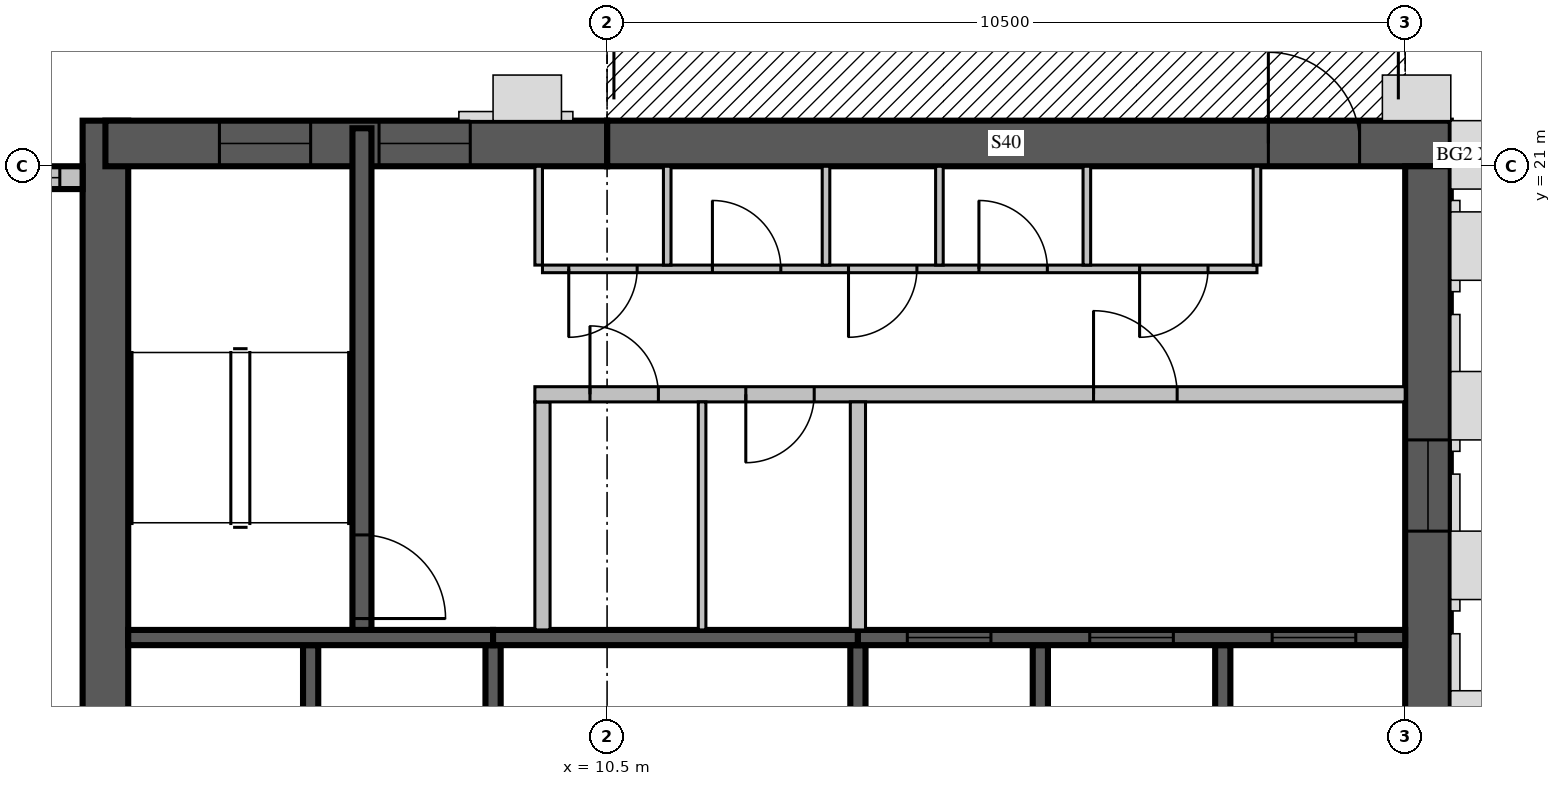
"""IFC4 building model, lengths in metres.
Left out: names, types, materials, properties, quantities, classifications, styles, units other than length and angle.
Written with IfcOpenShell. Run it as: python <this file> out.ifc"""

import sys

from ifc_helpers import new_model, si_unit, direction, frame, frame_2d, origin, place, context, subcontext, project, spatial, rectangle, extrude, source, transform, mapped, element, fill, save


model = new_model("IFC4")
c1 = context("Model", 3, precision=1e-05, world=origin(), true_north=direction((0.0, 1.0)))
c2 = subcontext(c1, "Body", "Model", "MODEL_VIEW")
j1 = project(units=[si_unit("LENGTHUNIT", "METRE"), si_unit("PLANEANGLEUNIT", "RADIAN")], contexts=[c1])
p1 = place(None, origin())
s1 = spatial("IfcSite", under=j1, at=p1, CompositionType="ELEMENT")
p2 = place(p1, origin())
s2 = spatial("IfcBuilding", under=s1, at=p2, CompositionType="ELEMENT")
p3 = place(p2, frame((0.0, 0.0, 309.0)))
s3 = spatial("IfcBuildingStorey", under=s2, at=p3, CompositionType="ELEMENT", Elevation=309.0)
m1 = source(origin(), c2, "Body", "SweptSolid", [
    extrude(rectangle(XDim=17.4, YDim=0.6, at=frame_2d((8.7, 0.0))), origin(), (0.0, 0.0, 1.0), 3.5),
])
p4 = place(p3, frame((3.9, 4.2, 0.0), z_axis=(0.0, 0.0, 1.0), x_axis=(0.0, 1.0, 0.0)))
e1 = element("IfcWall", 1, at=p4, inside=s3, PredefinedType="SHEAR", context=c2, shape_type="MappedRepresentation", body=[
    mapped(m1, transform((0.0, 0.0, 0.0), scale=1.0)),
])
m2 = source(origin(), c2, "Body", "SweptSolid", [
    extrude(rectangle(XDim=2.2, YDim=2.1, at=frame_2d((1.1, 1.05))), frame((0.0, 0.31, 0.0), z_axis=(0.0, -1.0, 0.0), x_axis=(1.0, 0.0, 0.0)), (0.0, 0.0, 1.0), 0.62),
])
p5 = place(p4, frame((4.2, 0.0, 0.0)))
e2 = element("IfcOpeningElement", 2, at=p5, cuts=e1, PredefinedType="OPENING", context=c2, shape_type="MappedRepresentation", body=[
    mapped(m2, transform((0.0, 0.0, 0.0), scale=1.0)),
])
m3 = source(origin(), c2, "Body", "SweptSolid", [
    extrude(rectangle(XDim=11.1, YDim=0.6, at=frame_2d((5.55, 0.0))), origin(), (0.0, 0.0, 1.0), 3.5),
])
p6 = place(p3, frame((10.5, 21.3, 0.0), z_axis=(0.0, 0.0, 1.0), x_axis=(1.0, 0.0, 0.0)))
e3 = element("IfcWall", 3, at=p6, inside=s3, PredefinedType="SHEAR", context=c2, shape_type="MappedRepresentation", body=[
    mapped(m3, transform((0.0, 0.0, 0.0), scale=1.0)),
])
m4 = source(origin(), c2, "Body", "SweptSolid", [
    extrude(rectangle(XDim=1.2, YDim=2.1, at=frame_2d((0.6, 1.05))), frame((0.0, 0.31, 0.0), z_axis=(0.0, -1.0, 0.0), x_axis=(1.0, 0.0, 0.0)), (0.0, 0.0, 1.0), 0.62),
])
p7 = place(p6, frame((8.7, 0.0, 0.0)))
e4 = element("IfcOpeningElement", 4, at=p7, cuts=e3, PredefinedType="OPENING", context=c2, shape_type="MappedRepresentation", body=[
    mapped(m4, transform((0.0, 0.0, 0.0), scale=1.0)),
])
m5 = source(origin(), c2, "Body", "SweptSolid", [
    extrude(rectangle(XDim=10.5, YDim=0.6, at=frame_2d((5.25, 0.0))), origin(), (0.0, 0.0, 1.0), 3.5),
])
p8 = place(p3, frame((21.3, 10.5, 0.0), z_axis=(0.0, 0.0, 1.0), x_axis=(0.0, 1.0, 0.0)))
e5 = element("IfcWall", 5, at=p8, inside=s3, PredefinedType="SHEAR", context=c2, shape_type="MappedRepresentation", body=[
    mapped(m5, transform((0.0, 0.0, 0.0), scale=1.0)),
])
m6 = source(origin(), c2, "Body", "SweptSolid", [
    extrude(rectangle(XDim=1.2, YDim=2.4, at=frame_2d((0.6, 1.2))), frame((0.0, 0.31, 0.0), z_axis=(0.0, -1.0, 0.0), x_axis=(1.0, 0.0, 0.0)), (0.0, 0.0, 1.0), 0.62),
])
p9 = place(p8, frame((5.7, 0.0, 0.6)))
e6 = element("IfcOpeningElement", 6, at=p9, cuts=e5, PredefinedType="OPENING", context=c2, shape_type="MappedRepresentation", body=[
    mapped(m6, transform((0.0, 0.0, 0.0), scale=1.0)),
])
m7 = source(origin(), c2, "Body", "SweptSolid", [
    extrude(rectangle(XDim=6.6, YDim=0.6, at=frame_2d((3.3, 0.0))), origin(), (0.0, 0.0, 1.0), 3.5),
])
p10 = place(p3, frame((3.9, 21.3, 0.0), z_axis=(0.0, 0.0, 1.0), x_axis=(1.0, 0.0, 0.0)))
e7 = element("IfcWall", 7, at=p10, inside=s3, PredefinedType="SHEAR", context=c2, shape_type="MappedRepresentation", body=[
    mapped(m7, transform((0.0, 0.0, 0.0), scale=1.0)),
])
p11 = place(p10, frame((1.5, 0.0, 0.6)))
e8 = element("IfcOpeningElement", 8, at=p11, cuts=e7, PredefinedType="OPENING", context=c2, shape_type="MappedRepresentation", body=[
    mapped(m6, transform((0.0, 0.0, 0.0), scale=1.0)),
])
p12 = place(p10, frame((3.6, 0.0, 0.6)))
e9 = element("IfcOpeningElement", 9, at=p12, cuts=e7, PredefinedType="OPENING", context=c2, shape_type="MappedRepresentation", body=[
    mapped(m6, transform((0.0, 0.0, 0.0), scale=1.0)),
])
m8 = source(origin(), c2, "Body", "SweptSolid", [
    extrude(rectangle(XDim=2.9, YDim=0.3, at=frame_2d((1.45, 0.0))), origin(), (0.0, 0.0, 1.0), 3.1),
])
p13 = place(p3, frame((3.6, 20.85, 0.0), z_axis=(0.0, 0.0, 1.0), x_axis=(-1.0, 0.0, 0.0)))
e10 = element("IfcWall", 10, at=p13, inside=s3, PredefinedType="STANDARD", context=c2, shape_type="MappedRepresentation", body=[
    mapped(m8, transform((0.0, 0.0, 0.0), scale=1.0)),
])
m9 = source(origin(), c2, "Body", "SweptSolid", [
    extrude(rectangle(XDim=2.4, YDim=2.0, at=frame_2d((1.2, 1.0))), frame((0.0, 0.16, 0.0), z_axis=(0.0, -1.0, 0.0), x_axis=(1.0, 0.0, 0.0)), (0.0, 0.0, 1.0), 0.32),
])
p14 = place(p13, frame((0.3, 0.0, 0.6)))
e11 = element("IfcOpeningElement", 11, at=p14, cuts=e10, PredefinedType="OPENING", context=c2, shape_type="MappedRepresentation", body=[
    mapped(m9, transform((0.0, 0.0, 0.0), scale=1.0)),
])
m10 = source(origin(), c2, "Body", "SweptSolid", [
    extrude(rectangle(XDim=3.0, YDim=0.2, at=frame_2d((1.5, 0.0))), origin(), (0.0, 0.0, 1.0), 3.5),
])
p15 = place(p3, frame((6.6, 11.7, 0.0), z_axis=(0.0, 0.0, 1.0), x_axis=(0.0, 1.0, 0.0)))
e12 = element("IfcWall", 12, at=p15, inside=s3, PredefinedType="SOLIDWALL", context=c2, shape_type="MappedRepresentation", body=[
    mapped(m10, transform((0.0, 0.0, 0.0), scale=1.0)),
])
m11 = source(origin(), c2, "Body", "SweptSolid", [
    extrude(rectangle(XDim=3.0, YDim=0.2, at=frame_2d((1.5, 0.0))), origin(), (0.0, 0.0, 1.0), 3.1),
])
for number, where, z_axis, x_axis in (
    (13, (9.0, 11.7, 0.0), (0.0, 0.0, 1.0), (0.0, 1.0, 0.0)),
    (14, (13.8, 11.7, 0.0), (0.0, 0.0, 1.0), (0.0, 1.0, 0.0)),
):
    element("IfcWall", number, at=place(p3, frame(where, z_axis=z_axis, x_axis=x_axis)), inside=s3, PredefinedType="SOLIDWALL", context=c2, shape_type="MappedRepresentation", body=[
        mapped(m11, transform((0.0, 0.0, 0.0), scale=1.0)),
    ])
for number, where, z_axis, x_axis in (
    (15, (16.2, 11.7, 0.0), (0.0, 0.0, 1.0), (0.0, 1.0, 0.0)),
    (16, (18.6, 11.7, 0.0), (0.0, 0.0, 1.0), (0.0, 1.0, 0.0)),
):
    element("IfcWall", number, at=place(p3, frame(where, z_axis=z_axis, x_axis=x_axis)), inside=s3, PredefinedType="SOLIDWALL", context=c2, shape_type="MappedRepresentation", body=[
        mapped(m10, transform((0.0, 0.0, 0.0), scale=1.0)),
    ])
m12 = source(origin(), c2, "Body", "SweptSolid", [
    extrude(rectangle(XDim=4.8, YDim=0.2, at=frame_2d((2.4, 0.0))), origin(), (0.0, 0.0, 1.0), 3.5),
])
p16 = place(p3, frame((4.2, 14.8, 0.0), z_axis=(0.0, 0.0, 1.0), x_axis=(1.0, 0.0, 0.0)))
e17 = element("IfcWall", 17, at=p16, inside=s3, PredefinedType="SOLIDWALL", context=c2, shape_type="MappedRepresentation", body=[
    mapped(m12, transform((0.0, 0.0, 0.0), scale=1.0)),
])
m13 = source(origin(), c2, "Body", "SweptSolid", [
    extrude(rectangle(XDim=4.8, YDim=0.2, at=frame_2d((2.4, 0.0))), origin(), (0.0, 0.0, 1.0), 3.1),
])
p17 = place(p3, frame((9.0, 14.8, 0.0), z_axis=(0.0, 0.0, 1.0), x_axis=(1.0, 0.0, 0.0)))
e18 = element("IfcWall", 18, at=p17, inside=s3, PredefinedType="SOLIDWALL", context=c2, shape_type="MappedRepresentation", body=[
    mapped(m13, transform((0.0, 0.0, 0.0), scale=1.0)),
])
m14 = source(origin(), c2, "Body", "SweptSolid", [
    extrude(rectangle(XDim=7.2, YDim=0.2, at=frame_2d((3.6, 0.0))), origin(), (0.0, 0.0, 1.0), 3.5),
])
p18 = place(p3, frame((13.8, 14.8, 0.0), z_axis=(0.0, 0.0, 1.0), x_axis=(1.0, 0.0, 0.0)))
e19 = element("IfcWall", 19, at=p18, inside=s3, PredefinedType="SOLIDWALL", context=c2, shape_type="MappedRepresentation", body=[
    mapped(m14, transform((0.0, 0.0, 0.0), scale=1.0)),
])
m15 = source(origin(), c2, "Body", "SweptSolid", [
    extrude(rectangle(XDim=1.1, YDim=2.1, at=frame_2d((0.55, 1.05))), frame((0.0, 0.11, 0.0), z_axis=(0.0, -1.0, 0.0), x_axis=(1.0, 0.0, 0.0)), (0.0, 0.0, 1.0), 0.22),
])
p19 = place(p18, frame((0.65, 0.0, 0.0)))
e20 = element("IfcOpeningElement", 20, at=p19, cuts=e19, PredefinedType="OPENING", context=c2, shape_type="MappedRepresentation", body=[
    mapped(m15, transform((0.0, 0.0, 0.0), scale=1.0)),
])
p20 = place(p18, frame((3.05, 0.0, 0.0)))
e21 = element("IfcOpeningElement", 21, at=p20, cuts=e19, PredefinedType="OPENING", context=c2, shape_type="MappedRepresentation", body=[
    mapped(m15, transform((0.0, 0.0, 0.0), scale=1.0)),
])
p21 = place(p18, frame((5.45, 0.0, 0.0)))
e22 = element("IfcOpeningElement", 22, at=p21, cuts=e19, PredefinedType="OPENING", context=c2, shape_type="MappedRepresentation", body=[
    mapped(m15, transform((0.0, 0.0, 0.0), scale=1.0)),
])
m16 = source(origin(), c2, "Body", "SweptSolid", [
    extrude(rectangle(XDim=6.6, YDim=0.25, at=frame_2d((3.3, 0.0))), origin(), (0.0, 0.0, 1.0), 3.1),
])
p22 = place(p3, frame((7.275, 14.9, 0.0), z_axis=(0.0, 0.0, 1.0), x_axis=(0.0, 1.0, 0.0)))
e23 = element("IfcWall", 23, at=p22, inside=s3, PredefinedType="SOLIDWALL", context=c2, shape_type="MappedRepresentation", body=[
    mapped(m16, transform((0.0, 0.0, 0.0), scale=1.0)),
])
m17 = source(origin(), c2, "Body", "SweptSolid", [
    extrude(rectangle(XDim=1.1, YDim=2.1, at=frame_2d((0.55, 1.05))), frame((0.0, 0.135, 0.0), z_axis=(0.0, -1.0, 0.0), x_axis=(1.0, 0.0, 0.0)), (0.0, 0.0, 1.0), 0.27),
])
p23 = place(p22, frame((0.15, 0.0, 0.0)))
e24 = element("IfcOpeningElement", 24, at=p23, cuts=e23, PredefinedType="OPENING", context=c2, shape_type="MappedRepresentation", body=[
    mapped(m17, transform((0.0, 0.0, 0.0), scale=1.0)),
])
m18 = source(origin(), c2, "Body", "SweptSolid", [
    extrude(rectangle(XDim=3.0, YDim=0.2, at=frame_2d((1.5, 0.0))), origin(), (0.0, 0.0, 1.0), 3.1),
])
p24 = place(p3, frame((9.65, 14.9, 0.0), z_axis=(0.0, 0.0, 1.0), x_axis=(0.0, 1.0, 0.0)))
e25 = element("IfcWall", 25, at=p24, inside=s3, PredefinedType="PARTITIONING", context=c2, shape_type="MappedRepresentation", body=[
    mapped(m18, transform((0.0, 0.0, 0.0), scale=1.0)),
])
m19 = source(origin(), c2, "Body", "SweptSolid", [
    extrude(rectangle(XDim=11.45, YDim=0.2, at=frame_2d((5.725, 0.0))), origin(), (0.0, 0.0, 1.0), 3.1),
])
p25 = place(p3, frame((9.55, 18.0, 0.0), z_axis=(0.0, 0.0, 1.0), x_axis=(1.0, 0.0, 0.0)))
e26 = element("IfcWall", 26, at=p25, inside=s3, PredefinedType="PARTITIONING", context=c2, shape_type="MappedRepresentation", body=[
    mapped(m19, transform((0.0, 0.0, 0.0), scale=1.0)),
])
m20 = source(origin(), c2, "Body", "SweptSolid", [
    extrude(rectangle(XDim=0.9, YDim=2.1, at=frame_2d((0.45, 1.05))), frame((0.0, 0.11, 0.0), z_axis=(0.0, -1.0, 0.0), x_axis=(1.0, 0.0, 0.0)), (0.0, 0.0, 1.0), 0.22),
])
p26 = place(p25, frame((0.725, 0.0, 0.0)))
e27 = element("IfcOpeningElement", 27, at=p26, cuts=e26, PredefinedType="OPENING", context=c2, shape_type="MappedRepresentation", body=[
    mapped(m20, transform((0.0, 0.0, 0.0), scale=1.0)),
])
p27 = place(p25, frame((2.775, 0.0, 0.0)))
e28 = element("IfcOpeningElement", 28, at=p27, cuts=e26, PredefinedType="OPENING", context=c2, shape_type="MappedRepresentation", body=[
    mapped(m20, transform((0.0, 0.0, 0.0), scale=1.0)),
])
p28 = place(p25, frame((7.35, 0.0, 0.0)))
e29 = element("IfcOpeningElement", 29, at=p28, cuts=e26, PredefinedType="OPENING", context=c2, shape_type="MappedRepresentation", body=[
    mapped(m15, transform((0.0, 0.0, 0.0), scale=1.0)),
])
m21 = source(origin(), c2, "Body", "SweptSolid", [
    extrude(rectangle(XDim=9.4, YDim=0.1, at=frame_2d((4.7, 0.0))), origin(), (0.0, 0.0, 1.0), 3.1),
])
p29 = place(p3, frame((9.65, 19.65, 0.0), z_axis=(0.0, 0.0, 1.0), x_axis=(1.0, 0.0, 0.0)))
e30 = element("IfcWall", 30, at=p29, inside=s3, PredefinedType="PARTITIONING", context=c2, shape_type="MappedRepresentation", body=[
    mapped(m21, transform((0.0, 0.0, 0.0), scale=1.0)),
])
m22 = source(origin(), c2, "Body", "SweptSolid", [
    extrude(rectangle(XDim=0.9, YDim=2.1, at=frame_2d((0.45, 1.05))), frame((0.0, 0.06, 0.0), z_axis=(0.0, -1.0, 0.0), x_axis=(1.0, 0.0, 0.0)), (0.0, 0.0, 1.0), 0.12),
])
p30 = place(p29, frame((0.346, 0.0, 0.0)))
e31 = element("IfcOpeningElement", 31, at=p30, cuts=e30, PredefinedType="OPENING", context=c2, shape_type="MappedRepresentation", body=[
    mapped(m22, transform((0.0, 0.0, 0.0), scale=1.0)),
])
p31 = place(p29, frame((2.236, 0.0, 0.0)))
e32 = element("IfcOpeningElement", 32, at=p31, cuts=e30, PredefinedType="OPENING", context=c2, shape_type="MappedRepresentation", body=[
    mapped(m22, transform((0.0, 0.0, 0.0), scale=1.0)),
])
p32 = place(p29, frame((4.026, 0.0, 0.0)))
e33 = element("IfcOpeningElement", 33, at=p32, cuts=e30, PredefinedType="OPENING", context=c2, shape_type="MappedRepresentation", body=[
    mapped(m22, transform((0.0, 0.0, 0.0), scale=1.0)),
])
p33 = place(p29, frame((5.742, 0.0, 0.0)))
e34 = element("IfcOpeningElement", 34, at=p33, cuts=e30, PredefinedType="OPENING", context=c2, shape_type="MappedRepresentation", body=[
    mapped(m22, transform((0.0, 0.0, 0.0), scale=1.0)),
])
p34 = place(p29, frame((7.856, 0.0, 0.0)))
e35 = element("IfcOpeningElement", 35, at=p34, cuts=e30, PredefinedType="OPENING", context=c2, shape_type="MappedRepresentation", body=[
    mapped(m22, transform((0.0, 0.0, 0.0), scale=1.0)),
])
m23 = source(origin(), c2, "Body", "SweptSolid", [
    extrude(rectangle(XDim=1.3, YDim=0.1, at=frame_2d((0.65, 0.0))), origin(), (0.0, 0.0, 1.0), 3.1),
])
for number, where, z_axis, x_axis in (
    (36, (11.291, 19.7, 0.0), (0.0, 0.0, 1.0), (0.0, 1.0, 0.0)),
    (37, (13.38, 19.7, 0.0), (0.0, 0.0, 1.0), (0.0, 1.0, 0.0)),
    (38, (14.872, 19.7, 0.0), (0.0, 0.0, 1.0), (0.0, 1.0, 0.0)),
    (39, (16.812, 19.7, 0.0), (0.0, 0.0, 1.0), (0.0, 1.0, 0.0)),
    (40, (9.6, 19.7, 0.0), (0.0, 0.0, 1.0), (0.0, 1.0, 0.0)),
    (41, (19.05, 19.7, 0.0), (0.0, 0.0, 1.0), (0.0, 1.0, 0.0)),
):
    element("IfcWall", number, at=place(p3, frame(where, z_axis=z_axis, x_axis=x_axis)), inside=s3, PredefinedType="PARTITIONING", context=c2, shape_type="MappedRepresentation", body=[
        mapped(m23, transform((0.0, 0.0, 0.0), scale=1.0)),
    ])
p35 = place(p3, frame((13.8, 14.9, 0.0), z_axis=(0.0, 0.0, 1.0), x_axis=(0.0, 1.0, 0.0)))
e42 = element("IfcWall", 42, at=p35, inside=s3, PredefinedType="PARTITIONING", context=c2, shape_type="MappedRepresentation", body=[
    mapped(m18, transform((0.0, 0.0, 0.0), scale=1.0)),
])
m24 = source(origin(), c2, "Body", "SweptSolid", [
    extrude(rectangle(XDim=3.0, YDim=0.1, at=frame_2d((1.5, 0.0))), origin(), (0.0, 0.0, 1.0), 3.1),
])
p36 = place(p3, frame((11.75, 14.9, 0.0), z_axis=(0.0, 0.0, 1.0), x_axis=(0.0, 1.0, 0.0)))
e43 = element("IfcWall", 43, at=p36, inside=s3, PredefinedType="PARTITIONING", context=c2, shape_type="MappedRepresentation", body=[
    mapped(m24, transform((0.0, 0.0, 0.0), scale=1.0)),
])
m25 = source(origin(), c2, "Body", "SweptSolid", [
    extrude(rectangle(XDim=2.4, YDim=2.0, at=frame_2d((1.2, 1.0))), frame((0.0, 0.03, 0.0), z_axis=(0.0, -1.0, 0.0), x_axis=(1.0, 0.0, 0.0)), (0.0, 0.0, 1.0), 0.06),
])
p37 = place(p14, origin())
e44 = element("IfcWindow", 44, at=p37, inside=s3, PartitioningType="SINGLE_PANEL", PredefinedType="WINDOW", context=c2, shape_type="MappedRepresentation", body=[
    mapped(m25, transform((0.0, 0.0, 0.0), scale=1.0)),
])
fill(e11, e44)
m26 = source(origin(), c2, "Body", "SweptSolid", [
    extrude(rectangle(XDim=1.1, YDim=2.1, at=frame_2d((0.55, 1.05))), frame((0.0, 0.025, 0.0), z_axis=(0.0, -1.0, 0.0), x_axis=(1.0, 0.0, 0.0)), (0.0, 0.0, 1.0), 0.05),
])
p38 = place(p19, origin())
e45 = element("IfcDoor", 45, at=p38, inside=s3, OperationType="SLIDING_TO_LEFT", PredefinedType="DOOR", context=c2, shape_type="MappedRepresentation", body=[
    mapped(m26, transform((0.0, 0.0, 0.0), scale=1.0)),
])
fill(e20, e45)
p39 = place(p20, origin())
e46 = element("IfcDoor", 46, at=p39, inside=s3, OperationType="SLIDING_TO_LEFT", PredefinedType="DOOR", context=c2, shape_type="MappedRepresentation", body=[
    mapped(m26, transform((0.0, 0.0, 0.0), scale=1.0)),
])
fill(e21, e46)
p40 = place(p21, origin())
e47 = element("IfcDoor", 47, at=p40, inside=s3, OperationType="SLIDING_TO_LEFT", PredefinedType="DOOR", context=c2, shape_type="MappedRepresentation", body=[
    mapped(m26, transform((0.0, 0.0, 0.0), scale=1.0)),
])
fill(e22, e47)
p41 = place(p23, origin())
e48 = element("IfcDoor", 48, at=p41, inside=s3, OperationType="SINGLE_SWING_RIGHT", PredefinedType="DOOR", context=c2, shape_type="MappedRepresentation", body=[
    mapped(m26, transform((0.0, 0.0, 0.0), scale=1.0)),
])
fill(e24, e48)
m27 = source(origin(), c2, "Body", "SweptSolid", [
    extrude(rectangle(XDim=0.9, YDim=2.1, at=frame_2d((0.45, 1.05))), frame((0.0, 0.025, 0.0), z_axis=(0.0, -1.0, 0.0), x_axis=(1.0, 0.0, 0.0)), (0.0, 0.0, 1.0), 0.05),
])
p42 = place(p26, origin())
e49 = element("IfcDoor", 49, at=p42, inside=s3, OperationType="SINGLE_SWING_LEFT", PredefinedType="DOOR", context=c2, shape_type="MappedRepresentation", body=[
    mapped(m27, transform((0.0, 0.0, 0.0), scale=1.0)),
])
fill(e27, e49)
p43 = place(p27, origin())
e50 = element("IfcDoor", 50, at=p43, inside=s3, OperationType="SINGLE_SWING_RIGHT", PredefinedType="DOOR", context=c2, shape_type="MappedRepresentation", body=[
    mapped(m27, transform((0.0, 0.0, 0.0), scale=1.0)),
])
fill(e28, e50)
p44 = place(p28, origin())
e51 = element("IfcDoor", 51, at=p44, inside=s3, OperationType="SINGLE_SWING_LEFT", PredefinedType="DOOR", context=c2, shape_type="MappedRepresentation", body=[
    mapped(m26, transform((0.0, 0.0, 0.0), scale=1.0)),
])
fill(e29, e51)
p45 = place(p30, origin())
e52 = element("IfcDoor", 52, at=p45, inside=s3, OperationType="SINGLE_SWING_RIGHT", PredefinedType="DOOR", context=c2, shape_type="MappedRepresentation", body=[
    mapped(m27, transform((0.0, 0.0, 0.0), scale=1.0)),
])
fill(e31, e52)
p46 = place(p31, origin())
e53 = element("IfcDoor", 53, at=p46, inside=s3, OperationType="SINGLE_SWING_LEFT", PredefinedType="DOOR", context=c2, shape_type="MappedRepresentation", body=[
    mapped(m27, transform((0.0, 0.0, 0.0), scale=1.0)),
])
fill(e32, e53)
p47 = place(p32, origin())
e54 = element("IfcDoor", 54, at=p47, inside=s3, OperationType="SINGLE_SWING_RIGHT", PredefinedType="DOOR", context=c2, shape_type="MappedRepresentation", body=[
    mapped(m27, transform((0.0, 0.0, 0.0), scale=1.0)),
])
fill(e33, e54)
p48 = place(p33, origin())
e55 = element("IfcDoor", 55, at=p48, inside=s3, OperationType="SINGLE_SWING_LEFT", PredefinedType="DOOR", context=c2, shape_type="MappedRepresentation", body=[
    mapped(m27, transform((0.0, 0.0, 0.0), scale=1.0)),
])
fill(e34, e55)
p49 = place(p34, origin())
e56 = element("IfcDoor", 56, at=p49, inside=s3, OperationType="SINGLE_SWING_RIGHT", PredefinedType="DOOR", context=c2, shape_type="MappedRepresentation", body=[
    mapped(m27, transform((0.0, 0.0, 0.0), scale=1.0)),
])
fill(e35, e56)
m28 = source(origin(), c2, "Body", "SweptSolid", [
    extrude(rectangle(XDim=1.2, YDim=2.1, at=frame_2d((0.6, 1.05))), frame((0.0, 0.025, 0.0), z_axis=(0.0, -1.0, 0.0), x_axis=(1.0, 0.0, 0.0)), (0.0, 0.0, 1.0), 0.05),
])
p50 = place(p7, origin())
e57 = element("IfcDoor", 57, at=p50, inside=s3, OperationType="SINGLE_SWING_LEFT", PredefinedType="DOOR", context=c2, shape_type="MappedRepresentation", body=[
    mapped(m28, transform((0.0, 0.0, 0.0), scale=1.0)),
])
fill(e4, e57)
m29 = source(origin(), c2, "Body", "SweptSolid", [
    extrude(rectangle(XDim=1.2, YDim=2.4, at=frame_2d((0.6, 1.2))), frame((0.0, 0.03, 0.0), z_axis=(0.0, -1.0, 0.0), x_axis=(1.0, 0.0, 0.0)), (0.0, 0.0, 1.0), 0.06),
])
p51 = place(p9, origin())
e58 = element("IfcWindow", 58, at=p51, inside=s3, PartitioningType="SINGLE_PANEL", PredefinedType="WINDOW", context=c2, shape_type="MappedRepresentation", body=[
    mapped(m29, transform((0.0, 0.0, 0.0), scale=1.0)),
])
fill(e6, e58)
p52 = place(p11, origin())
e59 = element("IfcWindow", 59, at=p52, inside=s3, PartitioningType="SINGLE_PANEL", PredefinedType="WINDOW", context=c2, shape_type="MappedRepresentation", body=[
    mapped(m29, transform((0.0, 0.0, 0.0), scale=1.0)),
])
fill(e8, e59)
p53 = place(p12, origin())
e60 = element("IfcWindow", 60, at=p53, inside=s3, PartitioningType="SINGLE_PANEL", PredefinedType="WINDOW", context=c2, shape_type="MappedRepresentation", body=[
    mapped(m29, transform((0.0, 0.0, 0.0), scale=1.0)),
])
fill(e9, e60)
save(model, sys.argv[1])
